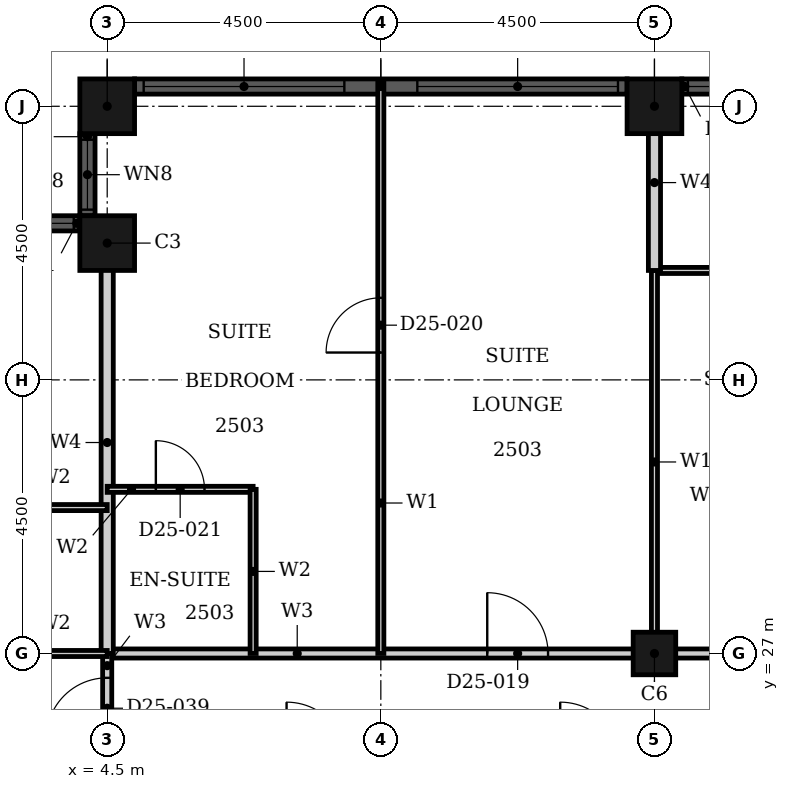
"""IFC4 building model, lengths in metres.
Left out: names, types, materials, properties, quantities, classifications, styles, units other than length and angle.
Written with IfcOpenShell. Run it as: python <this file> out.ifc"""

import sys

from ifc_helpers import new_model, si_unit, direction, frame, frame_2d, origin, origin_2d, place, context, subcontext, project, spatial, rectangle, hollow_rectangle, extrude, element, fill, save


model = new_model("IFC4")
c1 = context("Model", 3, precision=1e-05, world=origin(), true_north=direction((0.0, 1.0)))
c2 = subcontext(c1, "Body", "Model", "MODEL_VIEW")
j1 = project(units=[si_unit("LENGTHUNIT", "METRE"), si_unit("PLANEANGLEUNIT", "RADIAN")], contexts=[c1])
p1 = place(None, origin())
s1 = spatial("IfcSite", under=j1, at=p1, CompositionType="ELEMENT")
p2 = place(p1, origin())
s2 = spatial("IfcBuilding", under=s1, at=p2, CompositionType="ELEMENT")
p3 = place(p2, frame((0.0, 0.0, 104.4)))
s3 = spatial("IfcBuildingStorey", under=s2, at=p3, CompositionType="ELEMENT", Elevation=104.4)
for number, where, z_axis, x_axis in (
    (1, (13.5, 36.0, 0.0), (0.0, 0.0, 1.0), (1.0, 0.0, 0.0)),
    (2, (4.5, 36.0, 0.0), (0.0, 0.0, 1.0), (1.0, 0.0, 0.0)),
    (3, (4.5, 33.75, 0.0), (0.0, 0.0, 1.0), (1.0, 0.0, 0.0)),
):
    element("IfcColumn", number, at=place(p3, frame(where, z_axis=z_axis, x_axis=x_axis)), inside=s3, PredefinedType="COLUMN", context=c2, shape_type="SweptSolid", body=[
        extrude(hollow_rectangle(XDim=0.9, YDim=0.9, WallThickness=0.028, at=origin_2d()), origin(), (0.0, 0.0, 1.0), 3.6),
    ])
p4 = place(p3, frame((13.5, 27.0, 0.0), z_axis=(0.0, 0.0, 1.0), x_axis=(1.0, 0.0, 0.0)))
e4 = element("IfcColumn", 4, at=p4, inside=s3, PredefinedType="COLUMN", context=c2, shape_type="SweptSolid", body=[
    extrude(hollow_rectangle(XDim=0.7, YDim=0.7, WallThickness=0.022, at=origin_2d()), origin(), (0.0, 0.0, 1.0), 3.6),
])
p5 = place(p3, frame((15.3, 36.325, 0.0), z_axis=(0.0, 0.0, 1.0), x_axis=(-1.0, 0.0, 0.0)))
e5 = element("IfcWall", 5, at=p5, inside=s3, PredefinedType="SOLIDWALL", context=c2, shape_type="SweptSolid", body=[
    extrude(rectangle(XDim=1.35, YDim=0.25, at=frame_2d((0.675, 0.0))), origin(), (0.0, 0.0, 1.0), 3.6),
])
p6 = place(p5, frame((0.1, 0.0, 0.9)))
e6 = element("IfcOpeningElement", 6, at=p6, cuts=e5, PredefinedType="OPENING", context=c2, shape_type="SweptSolid", body=[
    extrude(rectangle(XDim=1.15, YDim=2.08, at=frame_2d((0.575, 1.04))), frame((0.0, 0.135, 0.0), z_axis=(0.0, -1.0, 0.0), x_axis=(1.0, 0.0, 0.0)), (0.0, 0.0, 1.0), 0.27),
])
p7 = place(p3, frame((13.05, 36.325, 0.0), z_axis=(0.0, 0.0, 1.0), x_axis=(-1.0, 0.0, 0.0)))
e7 = element("IfcWall", 7, at=p7, inside=s3, PredefinedType="SOLIDWALL", context=c2, shape_type="SweptSolid", body=[
    extrude(rectangle(XDim=8.1, YDim=0.25, at=frame_2d((4.05, 0.0))), origin(), (0.0, 0.0, 1.0), 3.6),
])
p8 = place(p7, frame((0.15, 0.0, 0.9)))
e8 = element("IfcOpeningElement", 8, at=p8, cuts=e7, PredefinedType="OPENING", context=c2, shape_type="SweptSolid", body=[
    extrude(rectangle(XDim=3.3, YDim=2.08, at=frame_2d((1.65, 1.04))), frame((0.0, 0.135, 0.0), z_axis=(0.0, -1.0, 0.0), x_axis=(1.0, 0.0, 0.0)), (0.0, 0.0, 1.0), 0.27),
])
p9 = place(p7, frame((4.65, 0.0, 0.9)))
e9 = element("IfcOpeningElement", 9, at=p9, cuts=e7, PredefinedType="OPENING", context=c2, shape_type="SweptSolid", body=[
    extrude(rectangle(XDim=3.3, YDim=2.08, at=frame_2d((1.65, 1.04))), frame((0.0, 0.135, 0.0), z_axis=(0.0, -1.0, 0.0), x_axis=(1.0, 0.0, 0.0)), (0.0, 0.0, 1.0), 0.27),
])
p10 = place(p3, frame((4.175, 35.55, 0.0), z_axis=(0.0, 0.0, 1.0), x_axis=(0.0, -1.0, 0.0)))
e10 = element("IfcWall", 10, at=p10, inside=s3, PredefinedType="SOLIDWALL", context=c2, shape_type="SweptSolid", body=[
    extrude(rectangle(XDim=1.35, YDim=0.25, at=frame_2d((0.675, 0.0))), origin(), (0.0, 0.0, 1.0), 3.6),
])
p11 = place(p10, frame((0.1, 0.0, 0.9)))
e11 = element("IfcOpeningElement", 11, at=p11, cuts=e10, PredefinedType="OPENING", context=c2, shape_type="SweptSolid", body=[
    extrude(rectangle(XDim=1.15, YDim=2.08, at=frame_2d((0.575, 1.04))), frame((0.0, 0.135, 0.0), z_axis=(0.0, -1.0, 0.0), x_axis=(1.0, 0.0, 0.0)), (0.0, 0.0, 1.0), 0.27),
])
p12 = place(p3, frame((4.05, 34.075, 0.0), z_axis=(0.0, 0.0, 1.0), x_axis=(-1.0, 0.0, 0.0)))
e12 = element("IfcWall", 12, at=p12, inside=s3, PredefinedType="SOLIDWALL", context=c2, shape_type="SweptSolid", body=[
    extrude(rectangle(XDim=1.35, YDim=0.25, at=frame_2d((0.675, 0.0))), origin(), (0.0, 0.0, 1.0), 3.6),
])
p13 = place(p12, frame((0.1, 0.0, 0.9)))
e13 = element("IfcOpeningElement", 13, at=p13, cuts=e12, PredefinedType="OPENING", context=c2, shape_type="SweptSolid", body=[
    extrude(rectangle(XDim=1.15, YDim=2.08, at=frame_2d((0.575, 1.04))), frame((0.0, 0.135, 0.0), z_axis=(0.0, -1.0, 0.0), x_axis=(1.0, 0.0, 0.0)), (0.0, 0.0, 1.0), 0.27),
])
p14 = place(p3, frame((4.5, 27.0, 0.0), z_axis=(0.0, 0.0, 1.0), x_axis=(1.0, 0.0, 0.0)))
e14 = element("IfcWall", 14, at=p14, inside=s3, PredefinedType="PARTITIONING", context=c2, shape_type="SweptSolid", body=[
    extrude(rectangle(XDim=11.7, YDim=0.15, at=frame_2d((5.85, 0.0))), origin(), (0.0, 0.0, 1.0), 2.58),
])
p15 = place(p14, frame((6.25, 0.0, 0.0)))
e15 = element("IfcOpeningElement", 15, at=p15, cuts=e14, PredefinedType="OPENING", context=c2, shape_type="SweptSolid", body=[
    extrude(rectangle(XDim=1.0, YDim=2.1, at=frame_2d((0.5, 1.05))), frame((0.0, 0.085, 0.0), z_axis=(0.0, -1.0, 0.0), x_axis=(1.0, 0.0, 0.0)), (0.0, 0.0, 1.0), 0.17),
])
p16 = place(p3, frame((4.5, 25.2, 0.0), z_axis=(0.0, 0.0, 1.0), x_axis=(0.0, 1.0, 0.0)))
e16 = element("IfcWall", 16, at=p16, inside=s3, PredefinedType="PARTITIONING", context=c2, shape_type="SweptSolid", body=[
    extrude(rectangle(XDim=1.8, YDim=0.15, at=frame_2d((0.9, 0.0))), origin(), (0.0, 0.0, 1.0), 3.3),
])
p17 = place(p16, frame((0.4, 0.0, 0.0)))
e17 = element("IfcOpeningElement", 17, at=p17, cuts=e16, PredefinedType="OPENING", context=c2, shape_type="SweptSolid", body=[
    extrude(rectangle(XDim=1.0, YDim=2.1, at=frame_2d((0.5, 1.05))), frame((0.0, 0.085, 0.0), z_axis=(0.0, -1.0, 0.0), x_axis=(1.0, 0.0, 0.0)), (0.0, 0.0, 1.0), 0.17),
])
p18 = place(p3, frame((13.5, 33.3, 0.0), z_axis=(0.0, 0.0, 1.0), x_axis=(1.0, 0.0, 0.0)))
e18 = element("IfcWall", 18, at=p18, inside=s3, PredefinedType="PARTITIONING", context=c2, shape_type="SweptSolid", body=[
    extrude(rectangle(XDim=2.7, YDim=0.1, at=frame_2d((1.35, 0.0))), origin(), (0.0, 0.0, 1.0), 3.3),
])
p19 = place(p3, frame((13.5, 27.0, 0.0), z_axis=(0.0, 0.0, 1.0), x_axis=(0.0, 1.0, 0.0)))
e19 = element("IfcWall", 19, at=p19, inside=s3, PredefinedType="PARTITIONING", context=c2, shape_type="SweptSolid", body=[
    extrude(rectangle(XDim=6.3, YDim=0.1, at=frame_2d((3.15, 0.0))), origin(), (0.0, 0.0, 1.0), 2.38),
])
p20 = place(p3, frame((9.0, 27.0, 0.0), z_axis=(0.0, 0.0, 1.0), x_axis=(0.0, 1.0, 0.0)))
e20 = element("IfcWall", 20, at=p20, inside=s3, PredefinedType="PARTITIONING", context=c2, shape_type="SweptSolid", body=[
    extrude(rectangle(XDim=9.39, YDim=0.1, at=frame_2d((4.695, 0.0))), origin(), (0.0, 0.0, 1.0), 3.3),
])
p21 = place(p20, frame((4.95, 0.0, 0.0)))
e21 = element("IfcOpeningElement", 21, at=p21, cuts=e20, PredefinedType="OPENING", context=c2, shape_type="SweptSolid", body=[
    extrude(rectangle(XDim=0.9, YDim=2.1, at=frame_2d((0.45, 1.05))), frame((0.0, 0.06, 0.0), z_axis=(0.0, -1.0, 0.0), x_axis=(1.0, 0.0, 0.0)), (0.0, 0.0, 1.0), 0.12),
])
p22 = place(p3, frame((13.5, 33.3, 0.0), z_axis=(0.0, 0.0, 1.0), x_axis=(0.0, 1.0, 0.0)))
e22 = element("IfcWall", 22, at=p22, inside=s3, PredefinedType="PARTITIONING", context=c2, shape_type="SweptSolid", body=[
    extrude(rectangle(XDim=2.89, YDim=0.2, at=frame_2d((1.445, 0.0))), origin(), (0.0, 0.0, 1.0), 2.38),
])
p23 = place(p3, frame((4.5, 27.0, 0.0), z_axis=(0.0, 0.0, 1.0), x_axis=(0.0, 1.0, 0.0)))
e23 = element("IfcWall", 23, at=p23, inside=s3, PredefinedType="PARTITIONING", context=c2, shape_type="SweptSolid", body=[
    extrude(rectangle(XDim=6.94, YDim=0.2, at=frame_2d((3.47, 0.0))), origin(), (0.0, 0.0, 1.0), 3.3),
])
p24 = place(p3, frame((1.8, 27.0, 0.0), z_axis=(0.0, 0.0, 1.0), x_axis=(1.0, 0.0, 0.0)))
e24 = element("IfcWall", 24, at=p24, inside=s3, PredefinedType="PARTITIONING", context=c2, shape_type="SweptSolid", body=[
    extrude(rectangle(XDim=2.7, YDim=0.1, at=frame_2d((1.35, 0.0))), origin(), (0.0, 0.0, 1.0), 2.58),
])
p25 = place(p3, frame((1.8, 29.4, 0.0), z_axis=(0.0, 0.0, 1.0), x_axis=(1.0, 0.0, 0.0)))
e25 = element("IfcWall", 25, at=p25, inside=s3, PredefinedType="PARTITIONING", context=c2, shape_type="SweptSolid", body=[
    extrude(rectangle(XDim=2.7, YDim=0.1, at=frame_2d((1.35, 0.0))), origin(), (0.0, 0.0, 1.0), 3.3),
])
p26 = place(p3, frame((4.5, 29.7, 0.0), z_axis=(0.0, 0.0, 1.0), x_axis=(1.0, 0.0, 0.0)))
e26 = element("IfcWall", 26, at=p26, inside=s3, PredefinedType="PARTITIONING", context=c2, shape_type="SweptSolid", body=[
    extrude(rectangle(XDim=2.4, YDim=0.1, at=frame_2d((1.2, 0.0))), origin(), (0.0, 0.0, 1.0), 3.3),
])
p27 = place(p26, frame((0.8, 0.0, 0.0)))
e27 = element("IfcOpeningElement", 27, at=p27, cuts=e26, PredefinedType="OPENING", context=c2, shape_type="SweptSolid", body=[
    extrude(rectangle(XDim=0.8, YDim=2.1, at=frame_2d((0.4, 1.05))), frame((0.0, 0.06, 0.0), z_axis=(0.0, -1.0, 0.0), x_axis=(1.0, 0.0, 0.0)), (0.0, 0.0, 1.0), 0.12),
])
p28 = place(p3, frame((6.9, 27.0, 0.0), z_axis=(0.0, 0.0, 1.0), x_axis=(0.0, 1.0, 0.0)))
e28 = element("IfcWall", 28, at=p28, inside=s3, PredefinedType="PARTITIONING", context=c2, shape_type="SweptSolid", body=[
    extrude(rectangle(XDim=2.7, YDim=0.1, at=frame_2d((1.35, 0.0))), origin(), (0.0, 0.0, 1.0), 3.3),
])
p29 = place(p6, origin())
e29 = element("IfcWindow", 29, at=p29, inside=s3, PartitioningType="SINGLE_PANEL", PredefinedType="WINDOW", context=c2, shape_type="SweptSolid", body=[
    extrude(rectangle(XDim=1.15, YDim=2.08, at=frame_2d((0.575, 1.04))), frame((0.0, 0.03, 0.0), z_axis=(0.0, -1.0, 0.0), x_axis=(1.0, 0.0, 0.0)), (0.0, 0.0, 1.0), 0.06),
])
fill(e6, e29)
p30 = place(p8, origin())
e30 = element("IfcWindow", 30, at=p30, inside=s3, PartitioningType="SINGLE_PANEL", PredefinedType="WINDOW", context=c2, shape_type="SweptSolid", body=[
    extrude(rectangle(XDim=3.3, YDim=2.08, at=frame_2d((1.65, 1.04))), frame((0.0, 0.03, 0.0), z_axis=(0.0, -1.0, 0.0), x_axis=(1.0, 0.0, 0.0)), (0.0, 0.0, 1.0), 0.06),
])
fill(e8, e30)
p31 = place(p9, origin())
e31 = element("IfcWindow", 31, at=p31, inside=s3, PartitioningType="SINGLE_PANEL", PredefinedType="WINDOW", context=c2, shape_type="SweptSolid", body=[
    extrude(rectangle(XDim=3.3, YDim=2.08, at=frame_2d((1.65, 1.04))), frame((0.0, 0.03, 0.0), z_axis=(0.0, -1.0, 0.0), x_axis=(1.0, 0.0, 0.0)), (0.0, 0.0, 1.0), 0.06),
])
fill(e9, e31)
p32 = place(p11, origin())
e32 = element("IfcWindow", 32, at=p32, inside=s3, PartitioningType="SINGLE_PANEL", PredefinedType="WINDOW", context=c2, shape_type="SweptSolid", body=[
    extrude(rectangle(XDim=1.15, YDim=2.08, at=frame_2d((0.575, 1.04))), frame((0.0, 0.03, 0.0), z_axis=(0.0, -1.0, 0.0), x_axis=(1.0, 0.0, 0.0)), (0.0, 0.0, 1.0), 0.06),
])
fill(e11, e32)
p33 = place(p13, origin())
e33 = element("IfcWindow", 33, at=p33, inside=s3, PartitioningType="SINGLE_PANEL", PredefinedType="WINDOW", context=c2, shape_type="SweptSolid", body=[
    extrude(rectangle(XDim=1.15, YDim=2.08, at=frame_2d((0.575, 1.04))), frame((0.0, 0.03, 0.0), z_axis=(0.0, -1.0, 0.0), x_axis=(1.0, 0.0, 0.0)), (0.0, 0.0, 1.0), 0.06),
])
fill(e13, e33)
p34 = place(p15, origin())
e34 = element("IfcDoor", 34, at=p34, inside=s3, OperationType="SINGLE_SWING_LEFT", PredefinedType="DOOR", context=c2, shape_type="SweptSolid", body=[
    extrude(rectangle(XDim=1.0, YDim=2.1, at=frame_2d((0.5, 1.05))), frame((0.0, 0.025, 0.0), z_axis=(0.0, -1.0, 0.0), x_axis=(1.0, 0.0, 0.0)), (0.0, 0.0, 1.0), 0.05),
])
fill(e15, e34)
p35 = place(p21, origin())
e35 = element("IfcDoor", 35, at=p35, inside=s3, OperationType="SINGLE_SWING_RIGHT", PredefinedType="DOOR", context=c2, shape_type="SweptSolid", body=[
    extrude(rectangle(XDim=0.9, YDim=2.1, at=frame_2d((0.45, 1.05))), frame((0.0, 0.025, 0.0), z_axis=(0.0, -1.0, 0.0), x_axis=(1.0, 0.0, 0.0)), (0.0, 0.0, 1.0), 0.05),
])
fill(e21, e35)
p36 = place(p27, origin())
e36 = element("IfcDoor", 36, at=p36, inside=s3, OperationType="SINGLE_SWING_LEFT", PredefinedType="DOOR", context=c2, shape_type="SweptSolid", body=[
    extrude(rectangle(XDim=0.8, YDim=2.1, at=frame_2d((0.4, 1.05))), frame((0.0, 0.025, 0.0), z_axis=(0.0, -1.0, 0.0), x_axis=(1.0, 0.0, 0.0)), (0.0, 0.0, 1.0), 0.05),
])
fill(e27, e36)
p37 = place(p17, origin())
e37 = element("IfcDoor", 37, at=p37, inside=s3, OperationType="SINGLE_SWING_RIGHT", PredefinedType="DOOR", context=c2, shape_type="SweptSolid", body=[
    extrude(rectangle(XDim=1.0, YDim=2.1, at=frame_2d((0.5, 1.05))), frame((0.0, 0.025, 0.0), z_axis=(0.0, -1.0, 0.0), x_axis=(1.0, 0.0, 0.0)), (0.0, 0.0, 1.0), 0.05),
])
fill(e17, e37)
save(model, sys.argv[1])
